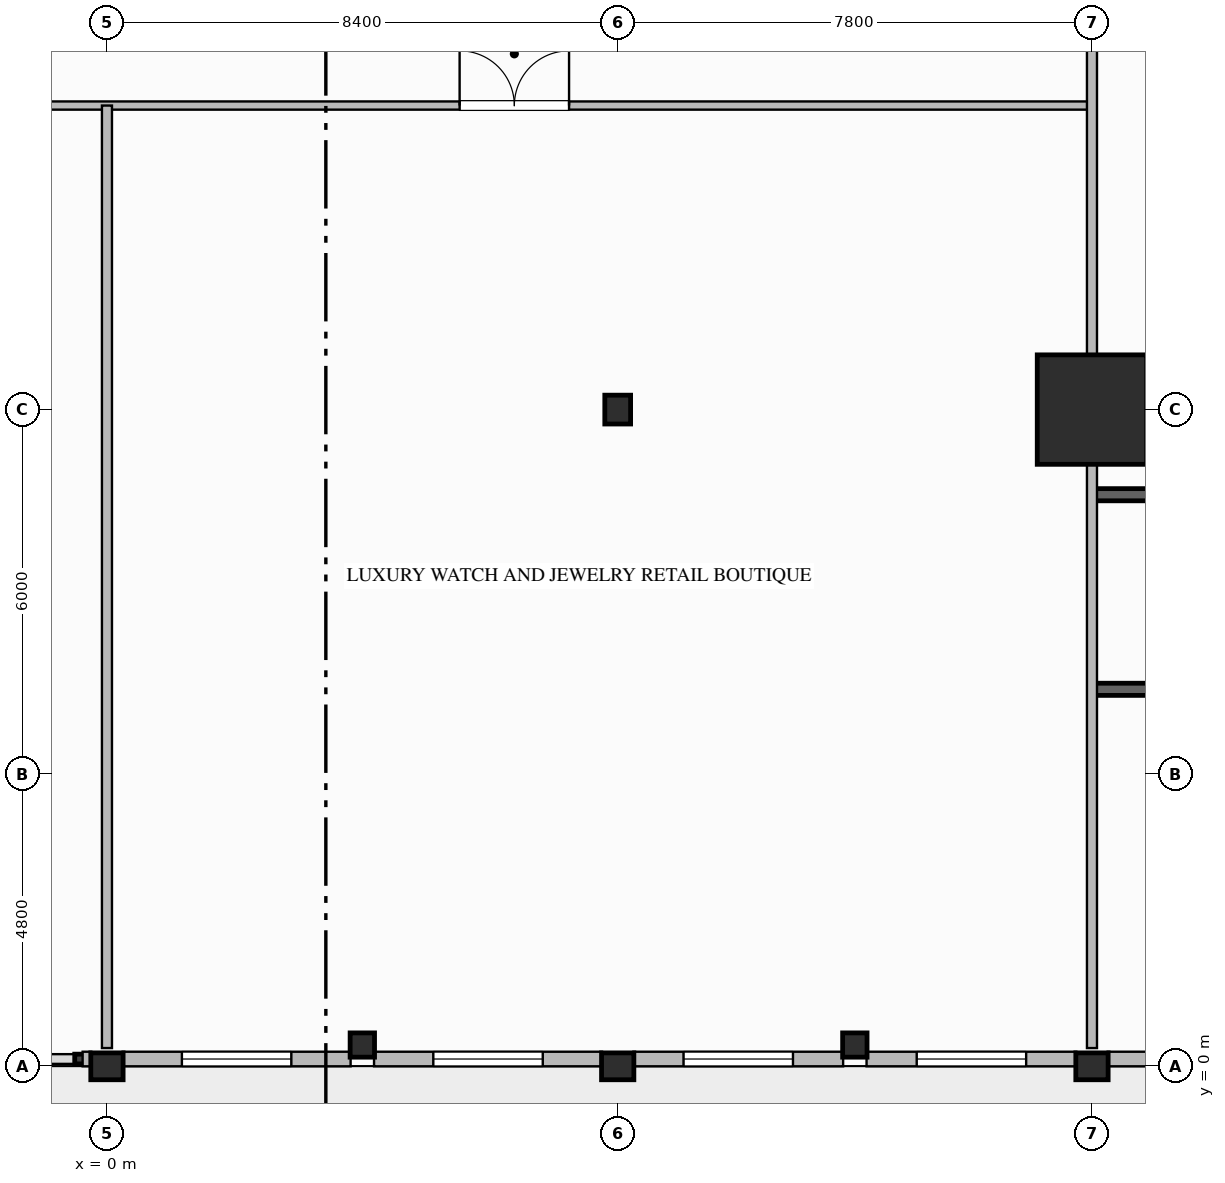
"""IFC4 building model, lengths in metres.
Left out: names, types, materials, properties, quantities, classifications, styles, units other than length and angle.
Written with IfcOpenShell. Run it as: python <this file> out.ifc"""

import sys

from ifc_helpers import new_model, si_unit, direction, frame, frame_2d, origin, origin_2d, place, context, subcontext, project, spatial, rectangle, i_section, extrude, element, fill, save


model = new_model("IFC4")
c1 = context("Model", 3, precision=1e-05, world=origin(), true_north=direction((0.0, 1.0)))
c2 = subcontext(c1, "Body", "Model", "MODEL_VIEW")
j1 = project(units=[si_unit("LENGTHUNIT", "METRE"), si_unit("PLANEANGLEUNIT", "RADIAN")], contexts=[c1])
p1 = place(None, origin())
s1 = spatial("IfcSite", under=j1, at=p1, CompositionType="ELEMENT")
p2 = place(p1, origin())
s2 = spatial("IfcBuilding", under=s1, at=p2, CompositionType="ELEMENT")
p3 = place(p2, origin())
s3 = spatial("IfcBuildingStorey", under=s2, at=p3, CompositionType="ELEMENT", Elevation=0.0)
p4 = place(p3, frame((16.2, 10.8, 0.0), z_axis=(0.0, 0.0, 1.0), x_axis=(1.0, 0.0, 0.0)))
e1 = element("IfcColumn", 1, at=p4, inside=s3, PredefinedType="COLUMN", context=c2, shape_type="SweptSolid", body=[
    extrude(rectangle(XDim=1.8, YDim=1.8, at=origin_2d()), origin(), (0.0, 0.0, 1.0), 5.6),
])
for number, where, z_axis, x_axis in (
    (2, (0.0, 0.0, 0.0), (0.0, 0.0, 1.0), (0.0, 1.0, 0.0)),
    (3, (8.4, 0.0, 0.0), (0.0, 0.0, 1.0), (0.0, 1.0, 0.0)),
    (4, (16.2, 0.0, 0.0), (0.0, 0.0, 1.0), (0.0, 1.0, 0.0)),
):
    element("IfcColumn", number, at=place(p3, frame(where, z_axis=z_axis, x_axis=x_axis)), inside=s3, PredefinedType="COLUMN", context=c2, shape_type="SweptSolid", body=[
        extrude(i_section(OverallWidth=0.442, OverallDepth=0.531, WebThickness=0.066, FlangeThickness=0.106, FilletRadius=0.03, at=origin_2d()), origin(), (0.0, 0.0, 1.0), 5.6),
    ])
p5 = place(p3, frame((8.4, 10.8, 0.0), z_axis=(0.0, 0.0, 1.0), x_axis=(1.0, 0.0, 0.0)))
e5 = element("IfcColumn", 5, at=p5, inside=s3, PredefinedType="COLUMN", context=c2, shape_type="SweptSolid", body=[
    extrude(i_section(OverallWidth=0.424, OverallDepth=0.474, WebThickness=0.048, FlangeThickness=0.077, FilletRadius=0.03, at=origin_2d()), origin(), (0.0, 0.0, 1.0), 5.6),
])
for number, where, z_axis, x_axis in (
    (6, (4.2, 0.35, 0.0), (0.0, 0.0, 1.0), (1.0, 0.0, 0.0)),
    (7, (12.3, 0.35, 0.0), (0.0, 0.0, 1.0), (1.0, 0.0, 0.0)),
):
    element("IfcColumn", number, at=place(p3, frame(where, z_axis=z_axis, x_axis=x_axis)), inside=s3, PredefinedType="COLUMN", context=c2, shape_type="SweptSolid", body=[
        extrude(i_section(OverallWidth=0.401, OverallDepth=0.399, WebThickness=0.025, FlangeThickness=0.04, FilletRadius=0.025, at=origin_2d()), origin(), (0.0, 0.0, 1.0), 5.6),
    ])
p6 = place(p3, frame((-0.258, 0.12, 0.0), z_axis=(0.0, 0.0, 1.0), x_axis=(-1.0, 0.0, 0.0)))
e8 = element("IfcWall", 8, at=p6, inside=s3, PredefinedType="STANDARD", context=c2, shape_type="SweptSolid", body=[
    extrude(rectangle(XDim=0.142, YDim=0.24, at=frame_2d((0.071, 0.0))), origin(), (0.0, 0.0, 1.0), 5.3),
])
p7 = place(p3, frame((4.007, 0.12, 0.0), z_axis=(0.0, 0.0, 1.0), x_axis=(-1.0, 0.0, 0.0)))
e9 = element("IfcWall", 9, at=p7, inside=s3, PredefinedType="STANDARD", context=c2, shape_type="SweptSolid", body=[
    extrude(rectangle(XDim=3.75, YDim=0.24, at=frame_2d((1.875, 0.0))), origin(), (0.0, 0.0, 1.0), 4.604),
])
p8 = place(p7, frame((0.975, 0.0, 0.65)))
e10 = element("IfcOpeningElement", 10, at=p8, cuts=e9, PredefinedType="OPENING", context=c2, shape_type="SweptSolid", body=[
    extrude(rectangle(XDim=1.8, YDim=2.2, at=frame_2d((0.9, 1.1))), frame((0.0, 0.13, 0.0), z_axis=(0.0, -1.0, 0.0), x_axis=(1.0, 0.0, 0.0)), (0.0, 0.0, 1.0), 0.26),
])
p9 = place(p3, frame((8.142, 0.12, 0.0), z_axis=(0.0, 0.0, 1.0), x_axis=(-1.0, 0.0, 0.0)))
e11 = element("IfcWall", 11, at=p9, inside=s3, PredefinedType="STANDARD", context=c2, shape_type="SweptSolid", body=[
    extrude(rectangle(XDim=3.75, YDim=0.24, at=frame_2d((1.875, 0.0))), origin(), (0.0, 0.0, 1.0), 4.604),
])
p10 = place(p9, frame((0.975, 0.0, 0.65)))
e12 = element("IfcOpeningElement", 12, at=p10, cuts=e11, PredefinedType="OPENING", context=c2, shape_type="SweptSolid", body=[
    extrude(rectangle(XDim=1.8, YDim=2.2, at=frame_2d((0.9, 1.1))), frame((0.0, 0.13, 0.0), z_axis=(0.0, -1.0, 0.0), x_axis=(1.0, 0.0, 0.0)), (0.0, 0.0, 1.0), 0.26),
])
p11 = place(p3, frame((12.107, 0.12, 0.0), z_axis=(0.0, 0.0, 1.0), x_axis=(-1.0, 0.0, 0.0)))
e13 = element("IfcWall", 13, at=p11, inside=s3, PredefinedType="STANDARD", context=c2, shape_type="SweptSolid", body=[
    extrude(rectangle(XDim=3.45, YDim=0.24, at=frame_2d((1.725, 0.0))), origin(), (0.0, 0.0, 1.0), 4.604),
])
p12 = place(p11, frame((0.825, 0.0, 0.65)))
e14 = element("IfcOpeningElement", 14, at=p12, cuts=e13, PredefinedType="OPENING", context=c2, shape_type="SweptSolid", body=[
    extrude(rectangle(XDim=1.8, YDim=2.2, at=frame_2d((0.9, 1.1))), frame((0.0, 0.13, 0.0), z_axis=(0.0, -1.0, 0.0), x_axis=(1.0, 0.0, 0.0)), (0.0, 0.0, 1.0), 0.26),
])
p13 = place(p3, frame((15.942, 0.12, 0.0), z_axis=(0.0, 0.0, 1.0), x_axis=(-1.0, 0.0, 0.0)))
e15 = element("IfcWall", 15, at=p13, inside=s3, PredefinedType="STANDARD", context=c2, shape_type="SweptSolid", body=[
    extrude(rectangle(XDim=3.45, YDim=0.24, at=frame_2d((1.725, 0.0))), origin(), (0.0, 0.0, 1.0), 4.604),
])
p14 = place(p13, frame((0.825, 0.0, 0.65)))
e16 = element("IfcOpeningElement", 16, at=p14, cuts=e15, PredefinedType="OPENING", context=c2, shape_type="SweptSolid", body=[
    extrude(rectangle(XDim=1.8, YDim=2.2, at=frame_2d((0.9, 1.1))), frame((0.0, 0.13, 0.0), z_axis=(0.0, -1.0, 0.0), x_axis=(1.0, 0.0, 0.0)), (0.0, 0.0, 1.0), 0.26),
])
p15 = place(p3, frame((19.007, 0.12, 0.0), z_axis=(0.0, 0.0, 1.0), x_axis=(-1.0, 0.0, 0.0)))
e17 = element("IfcWall", 17, at=p15, inside=s3, PredefinedType="STANDARD", context=c2, shape_type="SweptSolid", body=[
    extrude(rectangle(XDim=2.55, YDim=0.24, at=frame_2d((1.275, 0.0))), origin(), (0.0, 0.0, 1.0), 4.604),
])
p16 = place(p3, frame((16.2, 9.4, 0.0), z_axis=(0.0, 0.0, 1.0), x_axis=(1.0, 0.0, 0.0)))
e18 = element("IfcWall", 18, at=p16, inside=s3, PredefinedType="SOLIDWALL", context=c2, shape_type="SweptSolid", body=[
    extrude(rectangle(XDim=22.56, YDim=0.2, at=frame_2d((11.28, 0.0))), origin(), (0.0, 0.0, 1.0), 5.3),
])
p17 = place(p16, frame((4.0, 0.0, 0.0)))
e19 = element("IfcOpeningElement", 19, at=p17, cuts=e18, PredefinedType="OPENING", context=c2, shape_type="SweptSolid", body=[
    extrude(rectangle(XDim=1.15, YDim=2.15, at=frame_2d((0.575, 1.075))), frame((0.0, 0.11, 0.0), z_axis=(0.0, -1.0, 0.0), x_axis=(1.0, 0.0, 0.0)), (0.0, 0.0, 1.0), 0.22),
])
p18 = place(p3, frame((16.2, 6.2, 0.0), z_axis=(0.0, 0.0, 1.0), x_axis=(1.0, 0.0, 0.0)))
e20 = element("IfcWall", 20, at=p18, inside=s3, PredefinedType="SOLIDWALL", context=c2, shape_type="SweptSolid", body=[
    extrude(rectangle(XDim=22.56, YDim=0.2, at=frame_2d((11.28, 0.0))), origin(), (0.0, 0.0, 1.0), 5.3),
])
p19 = place(p18, frame((4.0, 0.0, 0.0)))
e21 = element("IfcOpeningElement", 21, at=p19, cuts=e20, PredefinedType="OPENING", context=c2, shape_type="SweptSolid", body=[
    extrude(rectangle(XDim=1.15, YDim=2.15, at=frame_2d((0.575, 1.075))), frame((0.0, 0.11, 0.0), z_axis=(0.0, -1.0, 0.0), x_axis=(1.0, 0.0, 0.0)), (0.0, 0.0, 1.0), 0.22),
])
p20 = place(p3, frame((-16.2, 15.8, 0.0), z_axis=(0.0, 0.0, 1.0), x_axis=(1.0, 0.0, 0.0)))
e22 = element("IfcWall", 22, at=p20, inside=s3, PredefinedType="PARTITIONING", context=c2, shape_type="SweptSolid", body=[
    extrude(rectangle(XDim=32.4, YDim=0.135, at=frame_2d((16.2, 0.0))), origin(), (0.0, 0.0, 1.0), 5.3),
])
p21 = place(p20, frame((6.5, 0.0, 0.0)))
e23 = element("IfcOpeningElement", 23, at=p21, cuts=e22, PredefinedType="OPENING", context=c2, shape_type="SweptSolid", body=[
    extrude(rectangle(XDim=1.8, YDim=2.35, at=frame_2d((0.9, 1.175))), frame((0.0, 0.077, 0.0), z_axis=(0.0, -1.0, 0.0), x_axis=(1.0, 0.0, 0.0)), (0.0, 0.0, 1.0), 0.155),
])
p22 = place(p20, frame((22.0, 0.0, 0.0)))
e24 = element("IfcOpeningElement", 24, at=p22, cuts=e22, PredefinedType="OPENING", context=c2, shape_type="SweptSolid", body=[
    extrude(rectangle(XDim=1.8, YDim=2.35, at=frame_2d((0.9, 1.175))), frame((0.0, 0.077, 0.0), z_axis=(0.0, -1.0, 0.0), x_axis=(1.0, 0.0, 0.0)), (0.0, 0.0, 1.0), 0.155),
])
p23 = place(p3, frame((0.0, 0.3, 0.0), z_axis=(0.0, 0.0, 1.0), x_axis=(0.0, 1.0, 0.0)))
e25 = element("IfcWall", 25, at=p23, inside=s3, PredefinedType="PARTITIONING", context=c2, shape_type="SweptSolid", body=[
    extrude(rectangle(XDim=15.5, YDim=0.165, at=frame_2d((7.75, 0.0))), origin(), (0.0, 0.0, 1.0), 4.248),
])
p24 = place(p3, frame((16.2, 0.3, 0.0), z_axis=(0.0, 0.0, 1.0), x_axis=(0.0, 1.0, 0.0)))
e26 = element("IfcWall", 26, at=p24, inside=s3, PredefinedType="PARTITIONING", context=c2, shape_type="SweptSolid", body=[
    extrude(rectangle(XDim=26.05, YDim=0.165, at=frame_2d((13.025, 0.0))), origin(), (0.0, 0.0, 1.0), 4.337),
])
p25 = place(p8, origin())
e27 = element("IfcWindow", 27, at=p25, inside=s3, PartitioningType="SINGLE_PANEL", PredefinedType="WINDOW", context=c2, shape_type="SweptSolid", body=[
    extrude(rectangle(XDim=1.8, YDim=2.2, at=frame_2d((0.9, 1.1))), frame((0.0, 0.03, 0.0), z_axis=(0.0, -1.0, 0.0), x_axis=(1.0, 0.0, 0.0)), (0.0, 0.0, 1.0), 0.06),
])
fill(e10, e27)
p26 = place(p10, origin())
e28 = element("IfcWindow", 28, at=p26, inside=s3, PartitioningType="SINGLE_PANEL", PredefinedType="WINDOW", context=c2, shape_type="SweptSolid", body=[
    extrude(rectangle(XDim=1.8, YDim=2.2, at=frame_2d((0.9, 1.1))), frame((0.0, 0.03, 0.0), z_axis=(0.0, -1.0, 0.0), x_axis=(1.0, 0.0, 0.0)), (0.0, 0.0, 1.0), 0.06),
])
fill(e12, e28)
p27 = place(p12, origin())
e29 = element("IfcWindow", 29, at=p27, inside=s3, PartitioningType="SINGLE_PANEL", PredefinedType="WINDOW", context=c2, shape_type="SweptSolid", body=[
    extrude(rectangle(XDim=1.8, YDim=2.2, at=frame_2d((0.9, 1.1))), frame((0.0, 0.03, 0.0), z_axis=(0.0, -1.0, 0.0), x_axis=(1.0, 0.0, 0.0)), (0.0, 0.0, 1.0), 0.06),
])
fill(e14, e29)
p28 = place(p14, origin())
e30 = element("IfcWindow", 30, at=p28, inside=s3, PartitioningType="SINGLE_PANEL", PredefinedType="WINDOW", context=c2, shape_type="SweptSolid", body=[
    extrude(rectangle(XDim=1.8, YDim=2.2, at=frame_2d((0.9, 1.1))), frame((0.0, 0.03, 0.0), z_axis=(0.0, -1.0, 0.0), x_axis=(1.0, 0.0, 0.0)), (0.0, 0.0, 1.0), 0.06),
])
fill(e16, e30)
p29 = place(p22, origin())
e31 = element("IfcDoor", 31, at=p29, inside=s3, OperationType="DOUBLE_DOOR_SINGLE_SWING", PredefinedType="DOOR", context=c2, shape_type="SweptSolid", body=[
    extrude(rectangle(XDim=1.8, YDim=2.35, at=frame_2d((0.9, 1.175))), frame((0.0, 0.025, 0.0), z_axis=(0.0, -1.0, 0.0), x_axis=(1.0, 0.0, 0.0)), (0.0, 0.0, 1.0), 0.05),
])
fill(e24, e31)
save(model, sys.argv[1])
